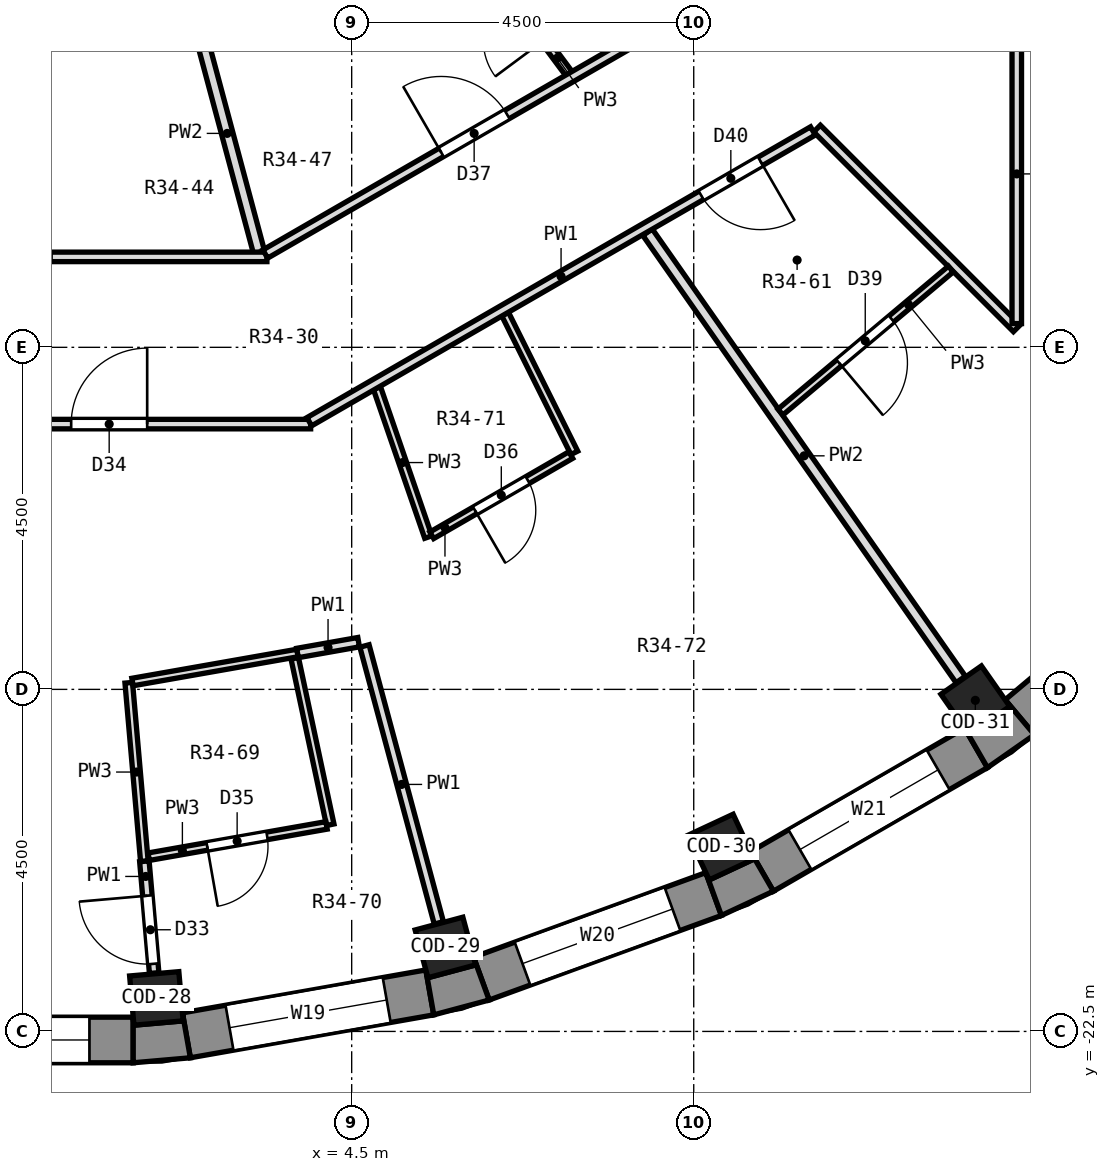
"""IFC4 building model, lengths in metres.
Left out: names, types, materials, properties, quantities, classifications, styles, units other than length and angle.
Written with IfcOpenShell. Run it as: python <this file> out.ifc"""

import sys

from ifc_helpers import new_model, si_unit, direction, frame, frame_2d, origin, origin_2d, place, context, subcontext, project, spatial, polyline, rectangle, outline, extrude, element, fill, save


model = new_model("IFC4")
c1 = context("Model", 3, precision=1e-05, world=origin(), true_north=direction((0.0, 1.0)))
c2 = subcontext(c1, "Body", "Model", "MODEL_VIEW")
j1 = project(units=[si_unit("LENGTHUNIT", "METRE"), si_unit("PLANEANGLEUNIT", "RADIAN")], contexts=[c1])
p1 = place(None, origin())
s1 = spatial("IfcSite", under=j1, at=p1, CompositionType="ELEMENT")
p2 = place(p1, origin())
s2 = spatial("IfcBuilding", under=s1, at=p2, CompositionType="ELEMENT")
p3 = place(p2, frame((0.0, 0.0, 239.6)))
s3 = spatial("IfcBuildingStorey", under=s2, at=p3, CompositionType="ELEMENT", Elevation=239.6)
for number, where, z_axis, x_axis in (
    (1, (1.93, -22.066, 0.0), (0.0, 0.0, 1.0), (0.087, -0.996, 0.0)),
    (2, (5.733, -21.395, 0.0), (0.0, 0.0, 1.0), (0.259, -0.966, 0.0)),
    (3, (9.361, -20.075, 0.0), (0.0, 0.0, 1.0), (0.423, -0.906, 0.0)),
    (4, (12.705, -18.144, 0.0), (0.0, 0.0, 1.0), (0.574, -0.819, 0.0)),
):
    element("IfcColumn", number, at=place(p3, frame(where, z_axis=z_axis, x_axis=x_axis)), inside=s3, PredefinedType="COLUMN", context=c2, shape_type="SweptSolid", body=[
        extrude(rectangle(XDim=0.65, YDim=0.65, at=origin_2d()), origin(), (0.0, 0.0, 1.0), 3.3),
    ])
p4 = place(p3, frame((-1.626, -22.613, 0.0), z_axis=(0.0, 0.0, 1.0), x_axis=(1.0, 0.0, 0.0)))
e5 = element("IfcWall", 5, at=p4, inside=s3, PredefinedType="SOLIDWALL", context=c2, shape_type="SweptSolid", body=[
    extrude(rectangle(XDim=3.251, YDim=0.6, at=frame_2d((1.626, 0.0))), origin(), (0.0, 0.0, 1.0), 2.9),
])
p5 = place(p4, frame((0.576, 0.0, 0.9)))
e6 = element("IfcOpeningElement", 6, at=p5, cuts=e5, PredefinedType="OPENING", context=c2, shape_type="SweptSolid", body=[
    extrude(rectangle(XDim=2.1, YDim=1.8, at=frame_2d((1.05, 0.9))), frame((0.0, 0.312, 0.0), z_axis=(0.0, -1.0, 0.0), x_axis=(1.0, 0.0, 0.0)), (0.0, 0.0, 1.0), 0.624),
])
p6 = place(p3, frame((2.325, -22.551, 0.0), z_axis=(0.0, 0.0, 1.0), x_axis=(0.984806225186, 0.173656842178, 0.0)))
e7 = element("IfcWall", 7, at=p6, inside=s3, PredefinedType="SOLIDWALL", context=c2, shape_type="SweptSolid", body=[
    extrude(rectangle(XDim=3.252, YDim=0.6, at=frame_2d((1.626, 0.0))), origin(), (0.0, 0.0, 1.0), 2.9),
])
p7 = place(p6, frame((0.576, 0.0, 0.9)))
e8 = element("IfcOpeningElement", 8, at=p7, cuts=e7, PredefinedType="OPENING", context=c2, shape_type="SweptSolid", body=[
    extrude(rectangle(XDim=2.1, YDim=1.8, at=frame_2d((1.05, 0.9))), frame((0.0, 0.312, 0.0), z_axis=(0.0, -1.0, 0.0), x_axis=(1.0, 0.0, 0.0)), (0.0, 0.0, 1.0), 0.624),
])
p8 = place(p3, frame((6.206, -21.805, 0.0), z_axis=(0.0, 0.0, 1.0), x_axis=(0.939679383794, 0.342056509473, 0.0)))
e9 = element("IfcWall", 9, at=p8, inside=s3, PredefinedType="SOLIDWALL", context=c2, shape_type="SweptSolid", body=[
    extrude(rectangle(XDim=3.252, YDim=0.6, at=frame_2d((1.626, 0.0))), origin(), (0.0, 0.0, 1.0), 2.9),
])
p9 = place(p8, frame((0.576, 0.0, 0.9)))
e10 = element("IfcOpeningElement", 10, at=p9, cuts=e9, PredefinedType="OPENING", context=c2, shape_type="SweptSolid", body=[
    extrude(rectangle(XDim=2.1, YDim=1.8, at=frame_2d((1.05, 0.9))), frame((0.0, 0.312, 0.0), z_axis=(0.0, -1.0, 0.0), x_axis=(1.0, 0.0, 0.0)), (0.0, 0.0, 1.0), 0.624),
])
p10 = place(p3, frame((9.898, -20.396, 0.0), z_axis=(0.0, 0.0, 1.0), x_axis=(0.866016800201, 0.500014901547, 0.0)))
e11 = element("IfcWall", 11, at=p10, inside=s3, PredefinedType="SOLIDWALL", context=c2, shape_type="SweptSolid", body=[
    extrude(rectangle(XDim=3.252, YDim=0.6, at=frame_2d((1.626, 0.0))), origin(), (0.0, 0.0, 1.0), 2.9),
])
p11 = place(p10, frame((0.576, 0.0, 0.9)))
e12 = element("IfcOpeningElement", 12, at=p11, cuts=e11, PredefinedType="OPENING", context=c2, shape_type="SweptSolid", body=[
    extrude(rectangle(XDim=2.1, YDim=1.8, at=frame_2d((1.05, 0.9))), frame((0.0, 0.312, 0.0), z_axis=(0.0, -1.0, 0.0), x_axis=(1.0, 0.0, 0.0)), (0.0, 0.0, 1.0), 0.624),
])
p12 = place(p3, frame((13.29, -18.367, 0.0), z_axis=(0.0, 0.0, 1.0), x_axis=(0.766056773982, 0.64277291405, 0.0)))
e13 = element("IfcWall", 13, at=p12, inside=s3, PredefinedType="SOLIDWALL", context=c2, shape_type="SweptSolid", body=[
    extrude(rectangle(XDim=3.252, YDim=0.6, at=frame_2d((1.626, 0.0))), origin(), (0.0, 0.0, 1.0), 2.9),
])
p13 = place(p12, frame((0.576, 0.0, 0.9)))
e14 = element("IfcOpeningElement", 14, at=p13, cuts=e13, PredefinedType="OPENING", context=c2, shape_type="SweptSolid", body=[
    extrude(rectangle(XDim=2.1, YDim=1.8, at=frame_2d((1.05, 0.9))), frame((0.0, 0.312, 0.0), z_axis=(0.0, -1.0, 0.0), x_axis=(1.0, 0.0, 0.0)), (0.0, 0.0, 1.0), 0.624),
])
p14 = place(p3, origin())
e15 = element("IfcWall", 15, at=p14, inside=s3, PredefinedType="SOLIDWALL", context=c2, shape_type="SweptSolid", body=[
    extrude(outline(polyline([(1.626, -22.913), (2.378, -22.847), (2.273, -22.256), (2.283, -22.361), (1.635, -22.418), (1.626, -22.312), (1.626, -22.913)])), origin(), (0.0, 0.0, 1.0), 2.9),
])
p15 = place(p3, origin())
e16 = element("IfcWall", 16, at=p15, inside=s3, PredefinedType="SOLIDWALL", context=c2, shape_type="SweptSolid", body=[
    extrude(outline(polyline([(6.309, -22.087), (6.104, -21.523), (6.131, -21.625), (5.503, -21.793), (5.476, -21.691), (5.58, -22.282), (6.309, -22.087)])), origin(), (0.0, 0.0, 1.0), 2.9),
])
p16 = place(p3, origin())
e17 = element("IfcWall", 17, at=p16, inside=s3, PredefinedType="SOLIDWALL", context=c2, shape_type="SweptSolid", body=[
    extrude(outline(polyline([(9.364, -20.975), (10.048, -20.656), (9.748, -20.136), (9.793, -20.232), (9.204, -20.507), (9.159, -20.411), (9.364, -20.975)])), origin(), (0.0, 0.0, 1.0), 2.9),
])
p17 = place(p3, origin())
e18 = element("IfcWall", 18, at=p17, inside=s3, PredefinedType="SOLIDWALL", context=c2, shape_type="SweptSolid", body=[
    extrude(outline(polyline([(12.864, -19.03), (13.482, -18.597), (13.097, -18.137), (13.157, -18.224), (12.625, -18.597), (12.564, -18.51), (12.864, -19.03)])), origin(), (0.0, 0.0, 1.0), 2.9),
])
p18 = place(p3, frame((1.567, -17.913, 0.0), z_axis=(0.0, 0.0, 1.0), x_axis=(0.087089873779, -0.996200458685, 0.0)))
e19 = element("IfcWall", 19, at=p18, inside=s3, PredefinedType="PARTITIONING", context=c2, shape_type="SweptSolid", body=[
    extrude(rectangle(XDim=2.358, YDim=0.1, at=frame_2d((1.179, 0.0))), origin(), (0.0, 0.0, 1.0), 2.9),
])
p19 = place(p3, frame((1.773, -20.262, 0.0), z_axis=(0.0, 0.0, 1.0), x_axis=(0.087179262922, -0.996192640063, 0.0)))
e20 = element("IfcWall", 20, at=p19, inside=s3, PredefinedType="PARTITIONING", context=c2, shape_type="SweptSolid", body=[
    extrude(rectangle(XDim=1.476, YDim=0.125, at=frame_2d((0.738, 0.0))), origin(), (0.0, 0.0, 1.0), 2.9),
])
p20 = place(p19, frame((0.454, 0.0, 0.0)))
e21 = element("IfcOpeningElement", 21, at=p20, cuts=e20, PredefinedType="OPENING", context=c2, shape_type="SweptSolid", body=[
    extrude(rectangle(XDim=0.9, YDim=2.1, at=frame_2d((0.45, 1.05))), frame((0.0, 0.074, 0.0), z_axis=(0.0, -1.0, 0.0), x_axis=(1.0, 0.0, 0.0)), (0.0, 0.0, 1.0), 0.149),
])
p21 = place(p3, frame((3.751, -17.591, 0.0), z_axis=(0.0, 0.0, 1.0), x_axis=(0.208598143884, -0.978001438837, 0.0)))
e22 = element("IfcWall", 22, at=p21, inside=s3, PredefinedType="PARTITIONING", context=c2, shape_type="SweptSolid", body=[
    extrude(rectangle(XDim=2.239, YDim=0.1, at=frame_2d((1.12, 0.0))), origin(), (0.0, 0.0, 1.0), 2.9),
])
p22 = place(p3, frame((4.668, -17.429, 0.0), z_axis=(0.0, 0.0, 1.0), x_axis=(0.259314134335, -0.965793031521, 0.0)))
e23 = element("IfcWall", 23, at=p22, inside=s3, PredefinedType="PARTITIONING", context=c2, shape_type="SweptSolid", body=[
    extrude(rectangle(XDim=3.771, YDim=0.125, at=frame_2d((1.886, 0.0))), origin(), (0.0, 0.0, 1.0), 2.9),
])
p23 = place(p3, frame((2.444, -9.121, 0.0), z_axis=(0.0, 0.0, 1.0), x_axis=(0.258356832743, -0.966049557205, 0.0)))
e24 = element("IfcWall", 24, at=p23, inside=s3, PredefinedType="PARTITIONING", context=c2, shape_type="SweptSolid", body=[
    extrude(rectangle(XDim=3.239, YDim=0.15, at=frame_2d((1.62, 0.0))), origin(), (0.0, 0.0, 1.0), 2.9),
])
p24 = place(p3, frame((4.833, -14.035, 0.0), z_axis=(0.0, 0.0, 1.0), x_axis=(0.325747589184, -0.945456772222, 0.0)))
e25 = element("IfcWall", 25, at=p24, inside=s3, PredefinedType="PARTITIONING", context=c2, shape_type="SweptSolid", body=[
    extrude(rectangle(XDim=2.074, YDim=0.1, at=frame_2d((1.037, 0.0))), origin(), (0.0, 0.0, 1.0), 2.9),
])
p25 = place(p3, frame((6.519, -13.063, 0.0), z_axis=(0.0, 0.0, 1.0), x_axis=(0.446207639569, -0.894929462243, 0.0)))
e26 = element("IfcWall", 26, at=p25, inside=s3, PredefinedType="PARTITIONING", context=c2, shape_type="SweptSolid", body=[
    extrude(rectangle(XDim=2.039, YDim=0.1, at=frame_2d((1.02, 0.0))), origin(), (0.0, 0.0, 1.0), 2.9),
])
p26 = place(p3, frame((8.392, -11.985, 0.0), z_axis=(0.0, 0.0, 1.0), x_axis=(0.573619710388, -0.819121741779, 0.0)))
e27 = element("IfcWall", 27, at=p26, inside=s3, PredefinedType="PARTITIONING", context=c2, shape_type="SweptSolid", body=[
    extrude(rectangle(XDim=7.184, YDim=0.15, at=frame_2d((3.592, 0.0))), origin(), (0.0, 0.0, 1.0), 2.9),
])
p27 = place(p3, frame((6.192, -8.33, 0.0), z_axis=(0.0, 0.0, 1.0), x_axis=(0.596570512615, -0.802560666541, 0.0)))
e28 = element("IfcWall", 28, at=p27, inside=s3, PredefinedType="PARTITIONING", context=c2, shape_type="SweptSolid", body=[
    extrude(rectangle(XDim=1.951, YDim=0.1, at=frame_2d((0.976, 0.0))), origin(), (0.0, 0.0, 1.0), 2.9),
])
p28 = place(p27, frame((0.607, 0.0, 0.0)))
e29 = element("IfcOpeningElement", 29, at=p28, cuts=e28, PredefinedType="OPENING", context=c2, shape_type="SweptSolid", body=[
    extrude(rectangle(XDim=0.8, YDim=2.1, at=frame_2d((0.4, 1.05))), frame((0.0, 0.062, 0.0), z_axis=(0.0, -1.0, 0.0), x_axis=(1.0, 0.0, 0.0)), (0.0, 0.0, 1.0), 0.124),
])
p29 = place(p3, frame((10.622, -10.622, 0.0), z_axis=(0.0, 0.0, 1.0), x_axis=(0.707106781187, -0.707106781187, 0.0)))
e30 = element("IfcWall", 30, at=p29, inside=s3, PredefinedType="PARTITIONING", context=c2, shape_type="SweptSolid", body=[
    extrude(rectangle(XDim=3.717, YDim=0.125, at=frame_2d((1.858, 0.0))), origin(), (0.0, 0.0, 1.0), 2.9),
])
p30 = place(p3, frame((-3.824, -14.51, 0.0), z_axis=(0.0, 0.0, 1.0), x_axis=(1.0, 0.0, 0.0)))
e31 = element("IfcWall", 31, at=p30, inside=s3, PredefinedType="PARTITIONING", context=c2, shape_type="SweptSolid", body=[
    extrude(rectangle(XDim=7.785, YDim=0.125, at=frame_2d((3.892, 0.0))), origin(), (0.0, 0.0, 1.0), 2.9),
])
p31 = place(p30, frame((0.796, 0.0, 0.0)))
e32 = element("IfcOpeningElement", 32, at=p31, cuts=e31, PredefinedType="OPENING", context=c2, shape_type="SweptSolid", body=[
    extrude(rectangle(XDim=0.9, YDim=2.1, at=frame_2d((0.45, 1.05))), frame((0.0, 0.074, 0.0), z_axis=(0.0, -1.0, 0.0), x_axis=(1.0, 0.0, 0.0)), (0.0, 0.0, 1.0), 0.149),
])
p32 = place(p30, frame((4.634, 0.0, 0.0)))
e33 = element("IfcOpeningElement", 33, at=p32, cuts=e31, PredefinedType="OPENING", context=c2, shape_type="SweptSolid", body=[
    extrude(rectangle(XDim=1.0, YDim=2.1, at=frame_2d((0.5, 1.05))), frame((0.0, 0.074, 0.0), z_axis=(0.0, -1.0, 0.0), x_axis=(1.0, 0.0, 0.0)), (0.0, 0.0, 1.0), 0.149),
])
p33 = place(p3, frame((-3.236, -12.31, 0.0), z_axis=(0.0, 0.0, 1.0), x_axis=(1.0, 0.0, 0.0)))
e34 = element("IfcWall", 34, at=p33, inside=s3, PredefinedType="PARTITIONING", context=c2, shape_type="SweptSolid", body=[
    extrude(rectangle(XDim=6.62, YDim=0.125, at=frame_2d((3.31, 0.0))), origin(), (0.0, 0.0, 1.0), 2.9),
])
p34 = place(p33, frame((2.787, 0.0, 0.0)))
e35 = element("IfcOpeningElement", 35, at=p34, cuts=e34, PredefinedType="OPENING", context=c2, shape_type="SweptSolid", body=[
    extrude(rectangle(XDim=1.0, YDim=2.1, at=frame_2d((0.5, 1.05))), frame((0.0, 0.074, 0.0), z_axis=(0.0, -1.0, 0.0), x_axis=(1.0, 0.0, 0.0)), (0.0, 0.0, 1.0), 0.149),
])
p35 = place(p3, frame((1.83, -20.201, 0.0), z_axis=(0.0, 0.0, 1.0), x_axis=(0.984867266046, 0.173310323615, 0.0)))
e36 = element("IfcWall", 36, at=p35, inside=s3, PredefinedType="PARTITIONING", context=c2, shape_type="SweptSolid", body=[
    extrude(rectangle(XDim=2.375, YDim=0.1, at=frame_2d((1.188, 0.0))), origin(), (0.0, 0.0, 1.0), 2.9),
])
p36 = place(p35, frame((0.781, 0.0, 0.0)))
e37 = element("IfcOpeningElement", 37, at=p36, cuts=e36, PredefinedType="OPENING", context=c2, shape_type="SweptSolid", body=[
    extrude(rectangle(XDim=0.8, YDim=2.1, at=frame_2d((0.4, 1.05))), frame((0.0, 0.062, 0.0), z_axis=(0.0, -1.0, 0.0), x_axis=(1.0, 0.0, 0.0)), (0.0, 0.0, 1.0), 0.124),
])
p37 = place(p3, frame((1.616, -17.903, 0.0), z_axis=(0.0, 0.0, 1.0), x_axis=(0.984865950047, 0.173317801847, 0.0)))
e38 = element("IfcWall", 38, at=p37, inside=s3, PredefinedType="PARTITIONING", context=c2, shape_type="SweptSolid", body=[
    extrude(rectangle(XDim=2.205, YDim=0.1, at=frame_2d((1.102, 0.0))), origin(), (0.0, 0.0, 1.0), 2.9),
])
p38 = place(p3, frame((3.787, -17.521, 0.0), z_axis=(0.0, 0.0, 1.0), x_axis=(0.984747422564, 0.173989981764, 0.0)))
e39 = element("IfcWall", 39, at=p38, inside=s3, PredefinedType="PARTITIONING", context=c2, shape_type="SweptSolid", body=[
    extrude(rectangle(XDim=0.817, YDim=0.125, at=frame_2d((0.408, 0.0))), origin(), (0.0, 0.0, 1.0), 2.9),
])
p39 = place(p3, frame((5.554, -15.973, 0.0), z_axis=(0.0, 0.0, 1.0), x_axis=(0.866072001774, 0.499919281227, 0.0)))
e40 = element("IfcWall", 40, at=p39, inside=s3, PredefinedType="PARTITIONING", context=c2, shape_type="SweptSolid", body=[
    extrude(rectangle(XDim=2.112, YDim=0.1, at=frame_2d((1.056, 0.0))), origin(), (0.0, 0.0, 1.0), 2.9),
])
p40 = place(p39, frame((0.656, 0.0, 0.0)))
e41 = element("IfcOpeningElement", 41, at=p40, cuts=e40, PredefinedType="OPENING", context=c2, shape_type="SweptSolid", body=[
    extrude(rectangle(XDim=0.8, YDim=2.1, at=frame_2d((0.4, 1.05))), frame((0.0, 0.062, 0.0), z_axis=(0.0, -1.0, 0.0), x_axis=(1.0, 0.0, 0.0)), (0.0, 0.0, 1.0), 0.124),
])
p41 = place(p3, frame((3.942, -14.479, 0.0), z_axis=(0.0, 0.0, 1.0), x_axis=(0.866021382195, 0.500006965533, 0.0)))
e42 = element("IfcWall", 42, at=p41, inside=s3, PredefinedType="PARTITIONING", context=c2, shape_type="SweptSolid", body=[
    extrude(rectangle(XDim=7.651, YDim=0.125, at=frame_2d((3.825, 0.0))), origin(), (0.0, 0.0, 1.0), 2.9),
])
p42 = place(p41, frame((5.954, 0.0, 0.0)))
e43 = element("IfcOpeningElement", 43, at=p42, cuts=e42, PredefinedType="OPENING", context=c2, shape_type="SweptSolid", body=[
    extrude(rectangle(XDim=0.9, YDim=2.1, at=frame_2d((0.45, 1.05))), frame((0.0, 0.074, 0.0), z_axis=(0.0, -1.0, 0.0), x_axis=(1.0, 0.0, 0.0)), (0.0, 0.0, 1.0), 0.149),
])
p43 = place(p3, frame((3.363, -12.272, 0.0), z_axis=(0.0, 0.0, 1.0), x_axis=(0.866083637917, 0.499899121956, 0.0)))
e44 = element("IfcWall", 44, at=p43, inside=s3, PredefinedType="PARTITIONING", context=c2, shape_type="SweptSolid", body=[
    extrude(rectangle(XDim=6.46, YDim=0.125, at=frame_2d((3.23, 0.0))), origin(), (0.0, 0.0, 1.0), 2.9),
])
p44 = place(p43, frame((2.673, 0.0, 0.0)))
e45 = element("IfcOpeningElement", 45, at=p44, cuts=e44, PredefinedType="OPENING", context=c2, shape_type="SweptSolid", body=[
    extrude(rectangle(XDim=1.0, YDim=2.1, at=frame_2d((0.5, 1.05))), frame((0.0, 0.074, 0.0), z_axis=(0.0, -1.0, 0.0), x_axis=(1.0, 0.0, 0.0)), (0.0, 0.0, 1.0), 0.149),
])
p45 = place(p3, frame((10.14, -14.352, 0.0), z_axis=(0.0, 0.0, 1.0), x_axis=(0.765946379397, 0.642904459378, 0.0)))
e46 = element("IfcWall", 46, at=p45, inside=s3, PredefinedType="PARTITIONING", context=c2, shape_type="SweptSolid", body=[
    extrude(rectangle(XDim=2.927, YDim=0.1, at=frame_2d((1.463, 0.0))), origin(), (0.0, 0.0, 1.0), 2.9),
])
p46 = place(p45, frame((1.007, 0.0, 0.0)))
e47 = element("IfcOpeningElement", 47, at=p46, cuts=e46, PredefinedType="OPENING", context=c2, shape_type="SweptSolid", body=[
    extrude(rectangle(XDim=0.9, YDim=2.1, at=frame_2d((0.45, 1.05))), frame((0.0, 0.062, 0.0), z_axis=(0.0, -1.0, 0.0), x_axis=(1.0, 0.0, 0.0)), (0.0, 0.0, 1.0), 0.124),
])
p47 = place(p3, frame((13.25, -13.188, 0.0), z_axis=(0.0, 0.0, 1.0), x_axis=(0.0, 1.0, 0.0)))
e48 = element("IfcWall", 48, at=p47, inside=s3, PredefinedType="PARTITIONING", context=c2, shape_type="SweptSolid", body=[
    extrude(rectangle(XDim=3.938, YDim=0.125, at=frame_2d((1.969, 0.0))), origin(), (0.0, 0.0, 1.0), 2.9),
])
p48 = place(p5, origin())
e49 = element("IfcWindow", 49, at=p48, inside=s3, PartitioningType="SINGLE_PANEL", PredefinedType="WINDOW", context=c2, shape_type="SweptSolid", body=[
    extrude(rectangle(XDim=2.1, YDim=1.8, at=frame_2d((1.05, 0.9))), frame((0.0, 0.18, 0.0), z_axis=(0.0, -1.0, 0.0), x_axis=(1.0, 0.0, 0.0)), (0.0, 0.0, 1.0), 0.06),
])
fill(e6, e49)
p49 = place(p7, origin())
e50 = element("IfcWindow", 50, at=p49, inside=s3, PartitioningType="SINGLE_PANEL", PredefinedType="WINDOW", context=c2, shape_type="SweptSolid", body=[
    extrude(rectangle(XDim=2.1, YDim=1.8, at=frame_2d((1.05, 0.9))), frame((0.0, 0.18, 0.0), z_axis=(0.0, -1.0, 0.0), x_axis=(1.0, 0.0, 0.0)), (0.0, 0.0, 1.0), 0.06),
])
fill(e8, e50)
p50 = place(p9, origin())
e51 = element("IfcWindow", 51, at=p50, inside=s3, PartitioningType="SINGLE_PANEL", PredefinedType="WINDOW", context=c2, shape_type="SweptSolid", body=[
    extrude(rectangle(XDim=2.1, YDim=1.8, at=frame_2d((1.05, 0.9))), frame((0.0, 0.18, 0.0), z_axis=(0.0, -1.0, 0.0), x_axis=(1.0, 0.0, 0.0)), (0.0, 0.0, 1.0), 0.06),
])
fill(e10, e51)
p51 = place(p11, origin())
e52 = element("IfcWindow", 52, at=p51, inside=s3, PartitioningType="SINGLE_PANEL", PredefinedType="WINDOW", context=c2, shape_type="SweptSolid", body=[
    extrude(rectangle(XDim=2.1, YDim=1.8, at=frame_2d((1.05, 0.9))), frame((0.0, 0.18, 0.0), z_axis=(0.0, -1.0, 0.0), x_axis=(1.0, 0.0, 0.0)), (0.0, 0.0, 1.0), 0.06),
])
fill(e12, e52)
p52 = place(p20, frame((0.9, 0.0, 0.0), z_axis=(0.0, 0.0, 1.0), x_axis=(-1.0, 0.0, 0.0)))
e53 = element("IfcDoor", 53, at=p52, inside=s3, OperationType="SINGLE_SWING_RIGHT", PredefinedType="DOOR", context=c2, shape_type="SweptSolid", body=[
    extrude(rectangle(XDim=0.9, YDim=2.1, at=frame_2d((0.45, 1.05))), frame((0.0, 0.025, 0.0), z_axis=(0.0, -1.0, 0.0), x_axis=(1.0, 0.0, 0.0)), (0.0, 0.0, 1.0), 0.05),
])
fill(e21, e53)
p53 = place(p32, origin())
e54 = element("IfcDoor", 54, at=p53, inside=s3, OperationType="SINGLE_SWING_RIGHT", PredefinedType="DOOR", context=c2, shape_type="SweptSolid", body=[
    extrude(rectangle(XDim=1.0, YDim=2.1, at=frame_2d((0.5, 1.05))), frame((0.0, 0.025, 0.0), z_axis=(0.0, -1.0, 0.0), x_axis=(1.0, 0.0, 0.0)), (0.0, 0.0, 1.0), 0.05),
])
fill(e33, e54)
p54 = place(p36, frame((0.8, 0.0, 0.0), z_axis=(0.0, 0.0, 1.0), x_axis=(-1.0, 0.0, 0.0)))
e55 = element("IfcDoor", 55, at=p54, inside=s3, OperationType="SINGLE_SWING_RIGHT", PredefinedType="DOOR", context=c2, shape_type="SweptSolid", body=[
    extrude(rectangle(XDim=0.8, YDim=2.1, at=frame_2d((0.4, 1.05))), frame((0.0, 0.025, 0.0), z_axis=(0.0, -1.0, 0.0), x_axis=(1.0, 0.0, 0.0)), (0.0, 0.0, 1.0), 0.05),
])
fill(e37, e55)
p55 = place(p40, frame((0.8, 0.0, 0.0), z_axis=(0.0, 0.0, 1.0), x_axis=(-1.0, 0.0, 0.0)))
e56 = element("IfcDoor", 56, at=p55, inside=s3, OperationType="SINGLE_SWING_RIGHT", PredefinedType="DOOR", context=c2, shape_type="SweptSolid", body=[
    extrude(rectangle(XDim=0.8, YDim=2.1, at=frame_2d((0.4, 1.05))), frame((0.0, 0.025, 0.0), z_axis=(0.0, -1.0, 0.0), x_axis=(1.0, 0.0, 0.0)), (0.0, 0.0, 1.0), 0.05),
])
fill(e41, e56)
p56 = place(p44, origin())
e57 = element("IfcDoor", 57, at=p56, inside=s3, OperationType="SINGLE_SWING_LEFT", PredefinedType="DOOR", context=c2, shape_type="SweptSolid", body=[
    extrude(rectangle(XDim=1.0, YDim=2.1, at=frame_2d((0.5, 1.05))), frame((0.0, 0.025, 0.0), z_axis=(0.0, -1.0, 0.0), x_axis=(1.0, 0.0, 0.0)), (0.0, 0.0, 1.0), 0.05),
])
fill(e45, e57)
p57 = place(p46, frame((0.9, 0.0, 0.0), z_axis=(0.0, 0.0, 1.0), x_axis=(-1.0, 0.0, 0.0)))
e58 = element("IfcDoor", 58, at=p57, inside=s3, OperationType="SINGLE_SWING_RIGHT", PredefinedType="DOOR", context=c2, shape_type="SweptSolid", body=[
    extrude(rectangle(XDim=0.9, YDim=2.1, at=frame_2d((0.45, 1.05))), frame((0.0, 0.025, 0.0), z_axis=(0.0, -1.0, 0.0), x_axis=(1.0, 0.0, 0.0)), (0.0, 0.0, 1.0), 0.05),
])
fill(e47, e58)
p58 = place(p42, frame((0.9, 0.0, 0.0), z_axis=(0.0, 0.0, 1.0), x_axis=(-1.0, 0.0, 0.0)))
e59 = element("IfcDoor", 59, at=p58, inside=s3, OperationType="SINGLE_SWING_LEFT", PredefinedType="DOOR", context=c2, shape_type="SweptSolid", body=[
    extrude(rectangle(XDim=0.9, YDim=2.1, at=frame_2d((0.45, 1.05))), frame((0.0, 0.025, 0.0), z_axis=(0.0, -1.0, 0.0), x_axis=(1.0, 0.0, 0.0)), (0.0, 0.0, 1.0), 0.05),
])
fill(e43, e59)
save(model, sys.argv[1])
